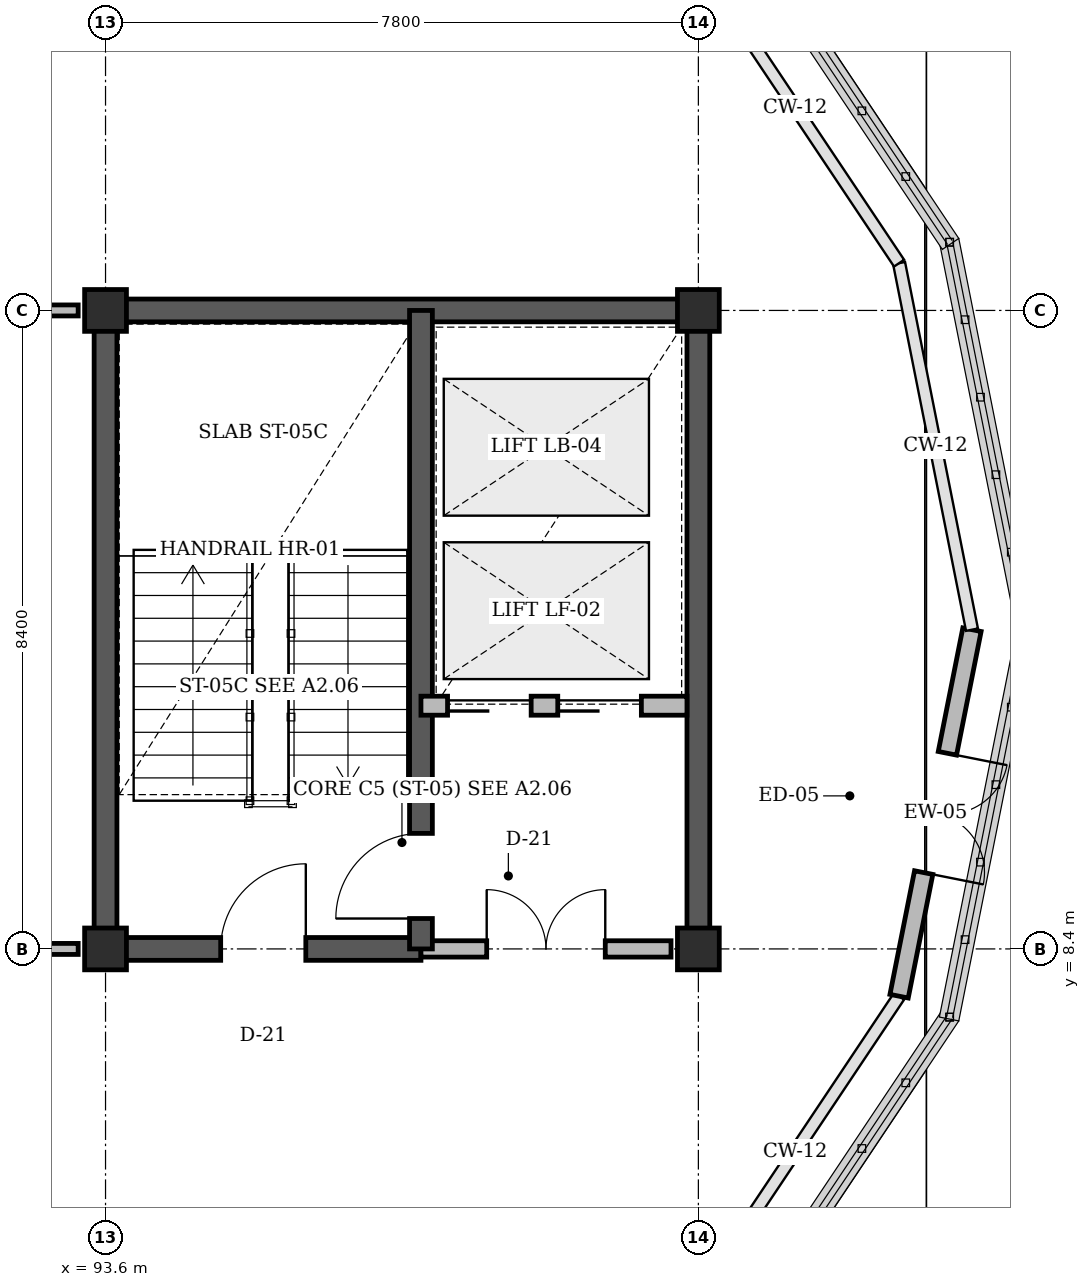
"""IFC4 building model, lengths in metres.
Left out: names, types, materials, properties, quantities, classifications, styles, units other than length and angle.
Written with IfcOpenShell. Run it as: python <this file> out.ifc"""

import sys

from ifc_helpers import new_model, si_unit, direction, frame, frame_2d, origin, origin_2d, place, context, subcontext, project, spatial, rectangle, extrude, element, fill, save


model = new_model("IFC4")
c1 = context("Model", 3, precision=1e-05, world=origin(), true_north=direction((0.0, 1.0)))
c2 = subcontext(c1, "Body", "Model", "MODEL_VIEW")
j1 = project(units=[si_unit("LENGTHUNIT", "METRE"), si_unit("PLANEANGLEUNIT", "RADIAN")], contexts=[c1])
p1 = place(None, origin())
s1 = spatial("IfcSite", under=j1, at=p1, CompositionType="ELEMENT")
p2 = place(p1, origin())
s2 = spatial("IfcBuilding", under=s1, at=p2, CompositionType="ELEMENT")
p3 = place(p2, frame((0.0, 0.0, 39.0)))
s3 = spatial("IfcBuildingStorey", under=s2, at=p3, CompositionType="ELEMENT", Elevation=39.0)
p4 = place(p3, frame((93.45, 16.8, 0.0), z_axis=(0.0, 0.0, 1.0), x_axis=(1.0, 0.0, 0.0)))
e1 = element("IfcWall", 1, at=p4, inside=s3, PredefinedType="SHEAR", context=c2, shape_type="SweptSolid", body=[
    extrude(rectangle(XDim=8.1, YDim=0.3, at=frame_2d((4.05, 0.0))), origin(), (0.0, 0.0, 1.0), 3.92),
])
for number, where, z_axis, x_axis in (
    (2, (93.6, 8.4, 0.0), (0.0, 0.0, 1.0), (0.0, 1.0, 0.0)),
    (3, (101.4, 8.4, 0.0), (0.0, 0.0, 1.0), (0.0, 1.0, 0.0)),
):
    element("IfcWall", number, at=place(p3, frame(where, z_axis=z_axis, x_axis=x_axis)), inside=s3, PredefinedType="SHEAR", context=c2, shape_type="SweptSolid", body=[
        extrude(rectangle(XDim=8.4, YDim=0.3, at=frame_2d((4.2, 0.0))), origin(), (0.0, 0.0, 1.0), 3.92),
    ])
for number, where, z_axis, x_axis in (
    (4, (93.6, 8.4, 0.0), (0.0, 0.0, 1.0), (1.0, 0.0, 0.0)),
    (5, (93.6, 16.8, 0.0), (0.0, 0.0, 1.0), (1.0, 0.0, 0.0)),
    (6, (101.4, 8.4, 0.0), (0.0, 0.0, 1.0), (1.0, 0.0, 0.0)),
    (7, (101.4, 16.8, 0.0), (0.0, 0.0, 1.0), (1.0, 0.0, 0.0)),
):
    element("IfcColumn", number, at=place(p3, frame(where, z_axis=z_axis, x_axis=x_axis)), inside=s3, PredefinedType="COLUMN", context=c2, shape_type="SweptSolid", body=[
        extrude(rectangle(XDim=0.55, YDim=0.55, at=origin_2d()), origin(), (0.0, 0.0, 1.0), 4.2),
    ])
p5 = place(p3, frame((105.0, 12.6, 0.0), z_axis=(0.0, 0.0, 1.0), x_axis=(-0.195065517012, -0.980790214099, 0.0)))
e8 = element("IfcWall", 8, at=p5, inside=s3, PredefinedType="STANDARD", context=c2, shape_type="SweptSolid", body=[
    extrude(rectangle(XDim=4.916, YDim=0.245, at=frame_2d((2.458, 0.0))), origin(), (0.0, 0.0, 1.0), 3.37),
])
p6 = place(p5, frame((1.658, 0.0, 0.0)))
e9 = element("IfcOpeningElement", 9, at=p6, cuts=e8, PredefinedType="OPENING", context=c2, shape_type="SweptSolid", body=[
    extrude(rectangle(XDim=1.6, YDim=2.2, at=frame_2d((0.8, 1.1))), frame((0.0, 0.133, 0.0), z_axis=(0.0, -1.0, 0.0), x_axis=(1.0, 0.0, 0.0)), (0.0, 0.0, 1.0), 0.265),
])
p7 = place(p3, frame((93.6, 8.4, 0.0), z_axis=(0.0, 0.0, 1.0), x_axis=(1.0, 0.0, 0.0)))
e10 = element("IfcWall", 10, at=p7, inside=s3, PredefinedType="SHEAR", context=c2, shape_type="SweptSolid", body=[
    extrude(rectangle(XDim=4.15, YDim=0.3, at=frame_2d((2.075, 0.0))), origin(), (0.0, 0.0, 1.0), 4.2),
])
p8 = place(p7, frame((1.515, 0.0, 0.0)))
e11 = element("IfcOpeningElement", 11, at=p8, cuts=e10, PredefinedType="OPENING", context=c2, shape_type="SweptSolid", body=[
    extrude(rectangle(XDim=1.12, YDim=2.15, at=frame_2d((0.56, 1.075))), frame((0.0, 0.16, 0.0), z_axis=(0.0, -1.0, 0.0), x_axis=(1.0, 0.0, 0.0)), (0.0, 0.0, 1.0), 0.32),
])
p9 = place(p3, frame((97.75, 8.4, 0.0), z_axis=(0.0, 0.0, 1.0), x_axis=(1.0, 0.0, 0.0)))
e12 = element("IfcWall", 12, at=p9, inside=s3, PredefinedType="STANDARD", context=c2, shape_type="SweptSolid", body=[
    extrude(rectangle(XDim=3.29, YDim=0.215, at=frame_2d((1.645, 0.0))), origin(), (0.0, 0.0, 1.0), 3.37),
])
p10 = place(p9, frame((0.865, 0.0, 0.0)))
e13 = element("IfcOpeningElement", 13, at=p10, cuts=e12, PredefinedType="OPENING", context=c2, shape_type="SweptSolid", body=[
    extrude(rectangle(XDim=1.56, YDim=2.2, at=frame_2d((0.78, 1.1))), frame((0.0, 0.118, 0.0), z_axis=(0.0, -1.0, 0.0), x_axis=(1.0, 0.0, 0.0)), (0.0, 0.0, 1.0), 0.235),
])
p11 = place(p3, frame((97.75, 8.4, 0.0), z_axis=(0.0, 0.0, 1.0), x_axis=(0.0, 1.0, 0.0)))
e14 = element("IfcWall", 14, at=p11, inside=s3, PredefinedType="SHEAR", context=c2, shape_type="SweptSolid", body=[
    extrude(rectangle(XDim=8.4, YDim=0.3, at=frame_2d((4.2, 0.0))), origin(), (0.0, 0.0, 1.0), 4.2),
])
p12 = place(p11, frame((0.4, 0.0, 0.0)))
e15 = element("IfcOpeningElement", 15, at=p12, cuts=e14, PredefinedType="OPENING", context=c2, shape_type="SweptSolid", body=[
    extrude(rectangle(XDim=1.12, YDim=2.15, at=frame_2d((0.56, 1.075))), frame((0.0, 0.16, 0.0), z_axis=(0.0, -1.0, 0.0), x_axis=(1.0, 0.0, 0.0)), (0.0, 0.0, 1.0), 0.32),
])
p13 = place(p3, frame((97.75, 11.6, 0.0), z_axis=(0.0, 0.0, 1.0), x_axis=(1.0, 0.0, 0.0)))
e16 = element("IfcWall", 16, at=p13, inside=s3, PredefinedType="STANDARD", context=c2, shape_type="SweptSolid", body=[
    extrude(rectangle(XDim=3.5, YDim=0.25, at=frame_2d((1.75, 0.0))), origin(), (0.0, 0.0, 1.0), 3.9),
])
p14 = place(p13, frame((0.35, 0.0, 0.0)))
e17 = element("IfcOpeningElement", 17, at=p14, cuts=e16, PredefinedType="OPENING", context=c2, shape_type="SweptSolid", body=[
    extrude(rectangle(XDim=1.1, YDim=2.2, at=frame_2d((0.55, 1.1))), frame((0.0, 0.135, 0.0), z_axis=(0.0, -1.0, 0.0), x_axis=(1.0, 0.0, 0.0)), (0.0, 0.0, 1.0), 0.27),
])
p15 = place(p13, frame((1.8, 0.0, 0.0)))
e18 = element("IfcOpeningElement", 18, at=p15, cuts=e16, PredefinedType="OPENING", context=c2, shape_type="SweptSolid", body=[
    extrude(rectangle(XDim=1.1, YDim=2.2, at=frame_2d((0.55, 1.1))), frame((0.0, 0.135, 0.0), z_axis=(0.0, -1.0, 0.0), x_axis=(1.0, 0.0, 0.0)), (0.0, 0.0, 1.0), 0.27),
])
p16 = place(p3, frame((86.16, 8.4, 0.0), z_axis=(0.0, 0.0, 1.0), x_axis=(1.0, 0.0, 0.0)))
e19 = element("IfcWall", 19, at=p16, inside=s3, PredefinedType="PARTITIONING", context=c2, shape_type="SweptSolid", body=[
    extrude(rectangle(XDim=7.08, YDim=0.145, at=frame_2d((3.54, 0.0))), origin(), (0.0, 0.0, 1.0), 3.37),
])
p17 = place(p16, frame((2.78, 0.0, 0.0)))
e20 = element("IfcOpeningElement", 20, at=p17, cuts=e19, PredefinedType="OPENING", context=c2, shape_type="SweptSolid", body=[
    extrude(rectangle(XDim=1.52, YDim=2.2, at=frame_2d((0.76, 1.1))), frame((0.0, 0.083, 0.0), z_axis=(0.0, -1.0, 0.0), x_axis=(1.0, 0.0, 0.0)), (0.0, 0.0, 1.0), 0.165),
])
p18 = place(p3, frame((86.16, 16.8, 0.0), z_axis=(0.0, 0.0, 1.0), x_axis=(1.0, 0.0, 0.0)))
e21 = element("IfcWall", 21, at=p18, inside=s3, PredefinedType="PARTITIONING", context=c2, shape_type="SweptSolid", body=[
    extrude(rectangle(XDim=7.08, YDim=0.145, at=frame_2d((3.54, 0.0))), origin(), (0.0, 0.0, 1.0), 3.37),
])
p19 = place(p6, origin())
e22 = element("IfcDoor", 22, at=p19, inside=s3, OperationType="DOUBLE_DOOR_SINGLE_SWING", PredefinedType="DOOR", context=c2, shape_type="SweptSolid", body=[
    extrude(rectangle(XDim=1.6, YDim=2.2, at=frame_2d((0.8, 1.1))), frame((0.0, 0.025, 0.0), z_axis=(0.0, -1.0, 0.0), x_axis=(1.0, 0.0, 0.0)), (0.0, 0.0, 1.0), 0.05),
])
fill(e9, e22)
p20 = place(p8, origin())
e23 = element("IfcDoor", 23, at=p20, inside=s3, OperationType="SINGLE_SWING_RIGHT", PredefinedType="DOOR", context=c2, shape_type="SweptSolid", body=[
    extrude(rectangle(XDim=1.12, YDim=2.15, at=frame_2d((0.56, 1.075))), frame((0.0, 0.025, 0.0), z_axis=(0.0, -1.0, 0.0), x_axis=(1.0, 0.0, 0.0)), (0.0, 0.0, 1.0), 0.05),
])
fill(e11, e23)
p21 = place(p10, origin())
e24 = element("IfcDoor", 24, at=p21, inside=s3, OperationType="DOUBLE_DOOR_SINGLE_SWING", PredefinedType="DOOR", context=c2, shape_type="SweptSolid", body=[
    extrude(rectangle(XDim=1.56, YDim=2.2, at=frame_2d((0.78, 1.1))), frame((0.0, 0.025, 0.0), z_axis=(0.0, -1.0, 0.0), x_axis=(1.0, 0.0, 0.0)), (0.0, 0.0, 1.0), 0.05),
])
fill(e13, e24)
p22 = place(p12, origin())
e25 = element("IfcDoor", 25, at=p22, inside=s3, OperationType="SINGLE_SWING_LEFT", PredefinedType="DOOR", context=c2, shape_type="SweptSolid", body=[
    extrude(rectangle(XDim=1.12, YDim=2.15, at=frame_2d((0.56, 1.075))), frame((0.0, 0.025, 0.0), z_axis=(0.0, -1.0, 0.0), x_axis=(1.0, 0.0, 0.0)), (0.0, 0.0, 1.0), 0.05),
])
fill(e15, e25)
p23 = place(p14, origin())
e26 = element("IfcDoor", 26, at=p23, inside=s3, OperationType="SLIDING_TO_LEFT", PredefinedType="DOOR", context=c2, shape_type="SweptSolid", body=[
    extrude(rectangle(XDim=1.1, YDim=2.2, at=frame_2d((0.55, 1.1))), frame((0.0, 0.025, 0.0), z_axis=(0.0, -1.0, 0.0), x_axis=(1.0, 0.0, 0.0)), (0.0, 0.0, 1.0), 0.05),
])
fill(e17, e26)
p24 = place(p15, origin())
e27 = element("IfcDoor", 27, at=p24, inside=s3, OperationType="SLIDING_TO_LEFT", PredefinedType="DOOR", context=c2, shape_type="SweptSolid", body=[
    extrude(rectangle(XDim=1.1, YDim=2.2, at=frame_2d((0.55, 1.1))), frame((0.0, 0.025, 0.0), z_axis=(0.0, -1.0, 0.0), x_axis=(1.0, 0.0, 0.0)), (0.0, 0.0, 1.0), 0.05),
])
fill(e18, e27)
save(model, sys.argv[1])
